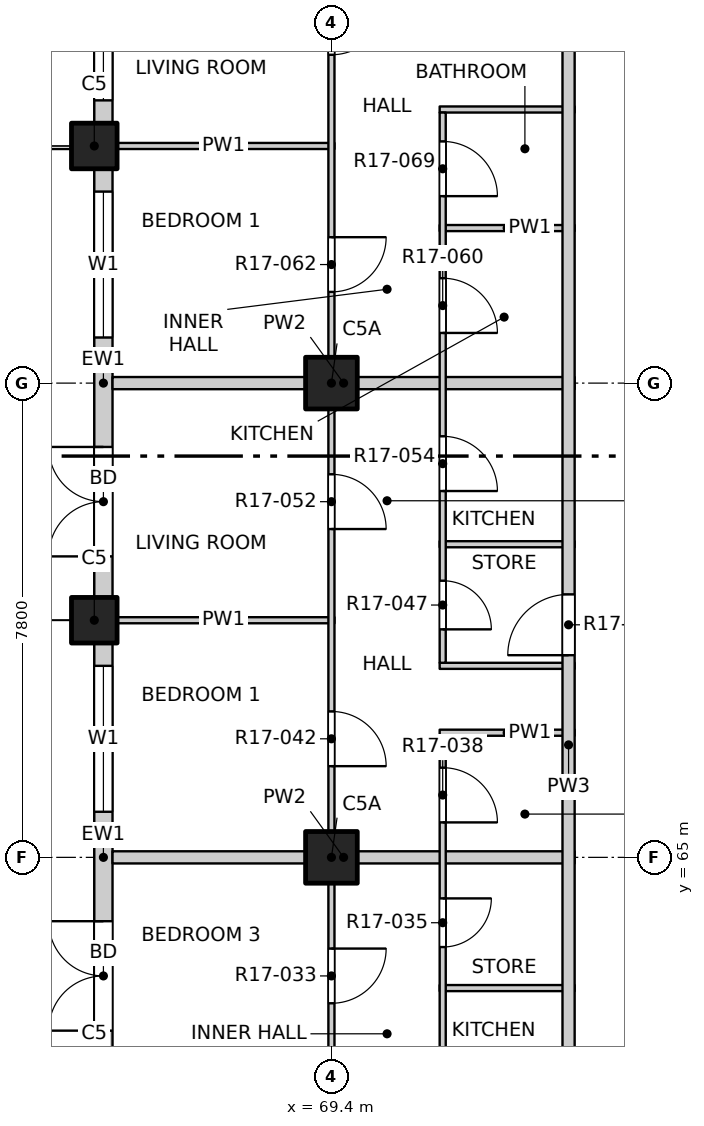
"""IFC4 building model, lengths in metres.
Left out: names, types, materials, properties, quantities, classifications, styles, units other than length and angle.
Written with IfcOpenShell. Run it as: python <this file> out.ifc"""

import sys

from ifc_helpers import new_model, si_unit, direction, frame, frame_2d, origin, origin_2d, place, context, subcontext, project, spatial, rectangle, extrude, element, fill, save


model = new_model("IFC4")
c1 = context("Model", 3, precision=1e-05, world=origin(), true_north=direction((0.0, 1.0)))
c2 = subcontext(c1, "Body", "Model", "MODEL_VIEW")
j1 = project(units=[si_unit("LENGTHUNIT", "METRE"), si_unit("PLANEANGLEUNIT", "RADIAN")], contexts=[c1])
p1 = place(None, origin())
s1 = spatial("IfcSite", under=j1, at=p1, CompositionType="ELEMENT")
p2 = place(p1, origin())
s2 = spatial("IfcBuilding", under=s1, at=p2, CompositionType="ELEMENT")
p3 = place(p2, frame((0.0, 0.0, 182.6)))
s3 = spatial("IfcBuildingStorey", under=s2, at=p3, CompositionType="ELEMENT", Elevation=182.6)
for number, where, z_axis, x_axis in (
    (1, (65.5, 68.9, -0.25), (0.0, 0.0, 1.0), (1.0, 0.0, 0.0)),
    (2, (65.5, 76.7, -0.25), (0.0, 0.0, 1.0), (1.0, 0.0, 0.0)),
):
    element("IfcColumn", number, at=place(p3, frame(where, z_axis=z_axis, x_axis=x_axis)), inside=s3, PredefinedType="COLUMN", context=c2, shape_type="SweptSolid", body=[
        extrude(rectangle(XDim=0.75, YDim=0.75, at=origin_2d()), origin(), (0.0, 0.0, 1.0), 3.4),
    ])
for number, where, z_axis, x_axis in (
    (3, (69.4, 65.0, -0.25), (0.0, 0.0, 1.0), (1.0, 0.0, 0.0)),
    (4, (69.4, 72.8, -0.25), (0.0, 0.0, 1.0), (1.0, 0.0, 0.0)),
):
    element("IfcColumn", number, at=place(p3, frame(where, z_axis=z_axis, x_axis=x_axis)), inside=s3, PredefinedType="COLUMN", context=c2, shape_type="SweptSolid", body=[
        extrude(rectangle(XDim=0.85, YDim=0.85, at=origin_2d()), origin(), (0.0, 0.0, 1.0), 3.4),
    ])
p4 = place(p3, frame((65.65, 61.475, 0.0), z_axis=(0.0, 0.0, 1.0), x_axis=(0.0, 1.0, 0.0)))
e5 = element("IfcWall", 5, at=p4, inside=s3, PredefinedType="SOLIDWALL", context=c2, shape_type="SweptSolid", body=[
    extrude(rectangle(XDim=7.05, YDim=0.3, at=frame_2d((3.525, 0.0))), origin(), (0.0, 0.0, 1.0), 2.7),
])
p5 = place(p4, frame((0.675, 0.0, 0.0)))
e6 = element("IfcOpeningElement", 6, at=p5, cuts=e5, PredefinedType="OPENING", context=c2, shape_type="SweptSolid", body=[
    extrude(rectangle(XDim=1.8, YDim=2.4, at=frame_2d((0.9, 1.2))), frame((0.0, 0.16, 0.0), z_axis=(0.0, -1.0, 0.0), x_axis=(1.0, 0.0, 0.0)), (0.0, 0.0, 1.0), 0.32),
])
p6 = place(p4, frame((4.275, 0.0, 0.9)))
e7 = element("IfcOpeningElement", 7, at=p6, cuts=e5, PredefinedType="OPENING", context=c2, shape_type="SweptSolid", body=[
    extrude(rectangle(XDim=2.4, YDim=1.8, at=frame_2d((1.2, 0.9))), frame((0.0, 0.16, 0.0), z_axis=(0.0, -1.0, 0.0), x_axis=(1.0, 0.0, 0.0)), (0.0, 0.0, 1.0), 0.32),
])
p7 = place(p3, frame((65.65, 69.275, 0.0), z_axis=(0.0, 0.0, 1.0), x_axis=(0.0, 1.0, 0.0)))
e8 = element("IfcWall", 8, at=p7, inside=s3, PredefinedType="SOLIDWALL", context=c2, shape_type="SweptSolid", body=[
    extrude(rectangle(XDim=7.05, YDim=0.3, at=frame_2d((3.525, 0.0))), origin(), (0.0, 0.0, 1.0), 2.7),
])
p8 = place(p7, frame((0.675, 0.0, 0.0)))
e9 = element("IfcOpeningElement", 9, at=p8, cuts=e8, PredefinedType="OPENING", context=c2, shape_type="SweptSolid", body=[
    extrude(rectangle(XDim=1.8, YDim=2.4, at=frame_2d((0.9, 1.2))), frame((0.0, 0.16, 0.0), z_axis=(0.0, -1.0, 0.0), x_axis=(1.0, 0.0, 0.0)), (0.0, 0.0, 1.0), 0.32),
])
p9 = place(p7, frame((4.275, 0.0, 0.9)))
e10 = element("IfcOpeningElement", 10, at=p9, cuts=e8, PredefinedType="OPENING", context=c2, shape_type="SweptSolid", body=[
    extrude(rectangle(XDim=2.4, YDim=1.8, at=frame_2d((1.2, 0.9))), frame((0.0, 0.16, 0.0), z_axis=(0.0, -1.0, 0.0), x_axis=(1.0, 0.0, 0.0)), (0.0, 0.0, 1.0), 0.32),
])
p10 = place(p3, frame((65.65, 77.075, 0.0), z_axis=(0.0, 0.0, 1.0), x_axis=(0.0, 1.0, 0.0)))
e11 = element("IfcWall", 11, at=p10, inside=s3, PredefinedType="SOLIDWALL", context=c2, shape_type="SweptSolid", body=[
    extrude(rectangle(XDim=3.525, YDim=0.3, at=frame_2d((1.763, 0.0))), origin(), (0.0, 0.0, 1.0), 2.7),
])
p11 = place(p10, frame((0.375, 0.0, 0.9)))
e12 = element("IfcOpeningElement", 12, at=p11, cuts=e11, PredefinedType="OPENING", context=c2, shape_type="SweptSolid", body=[
    extrude(rectangle(XDim=2.4, YDim=1.8, at=frame_2d((1.2, 0.9))), frame((0.0, 0.16, 0.0), z_axis=(0.0, -1.0, 0.0), x_axis=(1.0, 0.0, 0.0)), (0.0, 0.0, 1.0), 0.32),
])
p12 = place(p3, frame((71.18, 62.85, 0.0), z_axis=(0.0, 0.0, 1.0), x_axis=(1.0, 0.0, 0.0)))
e13 = element("IfcWall", 13, at=p12, inside=s3, PredefinedType="PARTITIONING", context=c2, shape_type="SweptSolid", body=[
    extrude(rectangle(XDim=2.22, YDim=0.1, at=frame_2d((1.11, 0.0))), origin(), (0.0, 0.0, 1.0), 3.15),
])
p13 = place(p3, frame((65.8, 65.0, 0.0), z_axis=(0.0, 0.0, 1.0), x_axis=(1.0, 0.0, 0.0)))
e14 = element("IfcWall", 14, at=p13, inside=s3, PredefinedType="PARTITIONING", context=c2, shape_type="SweptSolid", body=[
    extrude(rectangle(XDim=7.6, YDim=0.2, at=frame_2d((3.8, 0.0))), origin(), (0.0, 0.0, 1.0), 3.15),
])
for number, where, z_axis, x_axis in (
    (15, (71.18, 67.05, 0.0), (0.0, 0.0, 1.0), (1.0, 0.0, 0.0)),
    (16, (71.18, 68.15, 0.0), (0.0, 0.0, 1.0), (1.0, 0.0, 0.0)),
):
    element("IfcWall", number, at=place(p3, frame(where, z_axis=z_axis, x_axis=x_axis)), inside=s3, PredefinedType="PARTITIONING", context=c2, shape_type="SweptSolid", body=[
        extrude(rectangle(XDim=2.22, YDim=0.1, at=frame_2d((1.11, 0.0))), origin(), (0.0, 0.0, 1.0), 3.15),
    ])
p14 = place(p3, frame((65.8, 68.9, 0.0), z_axis=(0.0, 0.0, 1.0), x_axis=(1.0, 0.0, 0.0)))
e17 = element("IfcWall", 17, at=p14, inside=s3, PredefinedType="PARTITIONING", context=c2, shape_type="SweptSolid", body=[
    extrude(rectangle(XDim=3.65, YDim=0.1, at=frame_2d((1.825, 0.0))), origin(), (0.0, 0.0, 1.0), 2.55),
])
p15 = place(p3, frame((71.18, 70.15, 0.0), z_axis=(0.0, 0.0, 1.0), x_axis=(1.0, 0.0, 0.0)))
e18 = element("IfcWall", 18, at=p15, inside=s3, PredefinedType="PARTITIONING", context=c2, shape_type="SweptSolid", body=[
    extrude(rectangle(XDim=2.22, YDim=0.1, at=frame_2d((1.11, 0.0))), origin(), (0.0, 0.0, 1.0), 3.15),
])
p16 = place(p3, frame((65.8, 72.8, 0.0), z_axis=(0.0, 0.0, 1.0), x_axis=(1.0, 0.0, 0.0)))
e19 = element("IfcWall", 19, at=p16, inside=s3, PredefinedType="PARTITIONING", context=c2, shape_type="SweptSolid", body=[
    extrude(rectangle(XDim=7.6, YDim=0.2, at=frame_2d((3.8, 0.0))), origin(), (0.0, 0.0, 1.0), 3.15),
])
p17 = place(p3, frame((71.18, 75.35, 0.0), z_axis=(0.0, 0.0, 1.0), x_axis=(1.0, 0.0, 0.0)))
e20 = element("IfcWall", 20, at=p17, inside=s3, PredefinedType="PARTITIONING", context=c2, shape_type="SweptSolid", body=[
    extrude(rectangle(XDim=2.22, YDim=0.1, at=frame_2d((1.11, 0.0))), origin(), (0.0, 0.0, 1.0), 3.15),
])
p18 = place(p3, frame((65.8, 76.7, 0.0), z_axis=(0.0, 0.0, 1.0), x_axis=(1.0, 0.0, 0.0)))
e21 = element("IfcWall", 21, at=p18, inside=s3, PredefinedType="PARTITIONING", context=c2, shape_type="SweptSolid", body=[
    extrude(rectangle(XDim=3.65, YDim=0.1, at=frame_2d((1.825, 0.0))), origin(), (0.0, 0.0, 1.0), 2.55),
])
p19 = place(p3, frame((71.18, 77.3, 0.0), z_axis=(0.0, 0.0, 1.0), x_axis=(1.0, 0.0, 0.0)))
e22 = element("IfcWall", 22, at=p19, inside=s3, PredefinedType="PARTITIONING", context=c2, shape_type="SweptSolid", body=[
    extrude(rectangle(XDim=2.22, YDim=0.1, at=frame_2d((1.11, 0.0))), origin(), (0.0, 0.0, 1.0), 3.15),
])
p20 = place(p3, frame((69.4, 45.8, 0.0), z_axis=(0.0, 0.0, 1.0), x_axis=(0.0, 1.0, 0.0)))
e23 = element("IfcWall", 23, at=p20, inside=s3, PredefinedType="PARTITIONING", context=c2, shape_type="SweptSolid", body=[
    extrude(rectangle(XDim=38.4, YDim=0.1, at=frame_2d((19.2, 0.0))), origin(), (0.0, 0.0, 1.0), 3.15),
])
p21 = place(p20, frame((1.05, 0.0, 0.0)))
e24 = element("IfcOpeningElement", 24, at=p21, cuts=e23, PredefinedType="OPENING", context=c2, shape_type="SweptSolid", body=[
    extrude(rectangle(XDim=1.2, YDim=2.1, at=frame_2d((0.6, 1.05))), frame((0.0, 0.06, 0.0), z_axis=(0.0, -1.0, 0.0), x_axis=(1.0, 0.0, 0.0)), (0.0, 0.0, 1.0), 0.12),
])
p22 = place(p20, frame((6.9, 0.0, 0.0)))
e25 = element("IfcOpeningElement", 25, at=p22, cuts=e23, PredefinedType="OPENING", context=c2, shape_type="SweptSolid", body=[
    extrude(rectangle(XDim=1.2, YDim=2.1, at=frame_2d((0.6, 1.05))), frame((0.0, 0.06, 0.0), z_axis=(0.0, -1.0, 0.0), x_axis=(1.0, 0.0, 0.0)), (0.0, 0.0, 1.0), 0.12),
])
p23 = place(p20, frame((12.9, 0.0, 0.0)))
e26 = element("IfcOpeningElement", 26, at=p23, cuts=e23, PredefinedType="OPENING", context=c2, shape_type="SweptSolid", body=[
    extrude(rectangle(XDim=0.9, YDim=2.1, at=frame_2d((0.45, 1.05))), frame((0.0, 0.06, 0.0), z_axis=(0.0, -1.0, 0.0), x_axis=(1.0, 0.0, 0.0)), (0.0, 0.0, 1.0), 0.12),
])
p24 = place(p20, frame((16.8, 0.0, 0.0)))
e27 = element("IfcOpeningElement", 27, at=p24, cuts=e23, PredefinedType="OPENING", context=c2, shape_type="SweptSolid", body=[
    extrude(rectangle(XDim=0.9, YDim=2.1, at=frame_2d((0.45, 1.05))), frame((0.0, 0.06, 0.0), z_axis=(0.0, -1.0, 0.0), x_axis=(1.0, 0.0, 0.0)), (0.0, 0.0, 1.0), 0.12),
])
p25 = place(p20, frame((20.7, 0.0, 0.0)))
e28 = element("IfcOpeningElement", 28, at=p25, cuts=e23, PredefinedType="OPENING", context=c2, shape_type="SweptSolid", body=[
    extrude(rectangle(XDim=0.9, YDim=2.1, at=frame_2d((0.45, 1.05))), frame((0.0, 0.06, 0.0), z_axis=(0.0, -1.0, 0.0), x_axis=(1.0, 0.0, 0.0)), (0.0, 0.0, 1.0), 0.12),
])
p26 = place(p20, frame((24.6, 0.0, 0.0)))
e29 = element("IfcOpeningElement", 29, at=p26, cuts=e23, PredefinedType="OPENING", context=c2, shape_type="SweptSolid", body=[
    extrude(rectangle(XDim=0.9, YDim=2.1, at=frame_2d((0.45, 1.05))), frame((0.0, 0.06, 0.0), z_axis=(0.0, -1.0, 0.0), x_axis=(1.0, 0.0, 0.0)), (0.0, 0.0, 1.0), 0.12),
])
p27 = place(p20, frame((28.5, 0.0, 0.0)))
e30 = element("IfcOpeningElement", 30, at=p27, cuts=e23, PredefinedType="OPENING", context=c2, shape_type="SweptSolid", body=[
    extrude(rectangle(XDim=0.9, YDim=2.1, at=frame_2d((0.45, 1.05))), frame((0.0, 0.06, 0.0), z_axis=(0.0, -1.0, 0.0), x_axis=(1.0, 0.0, 0.0)), (0.0, 0.0, 1.0), 0.12),
])
p28 = place(p20, frame((32.4, 0.0, 0.0)))
e31 = element("IfcOpeningElement", 31, at=p28, cuts=e23, PredefinedType="OPENING", context=c2, shape_type="SweptSolid", body=[
    extrude(rectangle(XDim=0.9, YDim=2.1, at=frame_2d((0.45, 1.05))), frame((0.0, 0.06, 0.0), z_axis=(0.0, -1.0, 0.0), x_axis=(1.0, 0.0, 0.0)), (0.0, 0.0, 1.0), 0.12),
])
p29 = place(p20, frame((36.15, 0.0, 0.0)))
e32 = element("IfcOpeningElement", 32, at=p29, cuts=e23, PredefinedType="OPENING", context=c2, shape_type="SweptSolid", body=[
    extrude(rectangle(XDim=1.2, YDim=2.1, at=frame_2d((0.6, 1.05))), frame((0.0, 0.06, 0.0), z_axis=(0.0, -1.0, 0.0), x_axis=(1.0, 0.0, 0.0)), (0.0, 0.0, 1.0), 0.12),
])
p30 = place(p3, frame((71.23, 59.95, 0.0), z_axis=(0.0, 0.0, 1.0), x_axis=(0.0, 1.0, 0.0)))
e33 = element("IfcWall", 33, at=p30, inside=s3, PredefinedType="PARTITIONING", context=c2, shape_type="SweptSolid", body=[
    extrude(rectangle(XDim=7.05, YDim=0.1, at=frame_2d((3.525, 0.0))), origin(), (0.0, 0.0, 1.0), 3.15),
])
p31 = place(p30, frame((0.975, 0.0, 0.0)))
e34 = element("IfcOpeningElement", 34, at=p31, cuts=e33, PredefinedType="OPENING", context=c2, shape_type="SweptSolid", body=[
    extrude(rectangle(XDim=0.9, YDim=2.1, at=frame_2d((0.45, 1.05))), frame((0.0, 0.06, 0.0), z_axis=(0.0, -1.0, 0.0), x_axis=(1.0, 0.0, 0.0)), (0.0, 0.0, 1.0), 0.12),
])
p32 = place(p30, frame((3.575, 0.0, 0.0)))
e35 = element("IfcOpeningElement", 35, at=p32, cuts=e33, PredefinedType="OPENING", context=c2, shape_type="SweptSolid", body=[
    extrude(rectangle(XDim=0.8, YDim=2.1, at=frame_2d((0.4, 1.05))), frame((0.0, 0.06, 0.0), z_axis=(0.0, -1.0, 0.0), x_axis=(1.0, 0.0, 0.0)), (0.0, 0.0, 1.0), 0.12),
])
p33 = place(p30, frame((5.625, 0.0, 0.0)))
e36 = element("IfcOpeningElement", 36, at=p33, cuts=e33, PredefinedType="OPENING", context=c2, shape_type="SweptSolid", body=[
    extrude(rectangle(XDim=0.9, YDim=2.1, at=frame_2d((0.45, 1.05))), frame((0.0, 0.06, 0.0), z_axis=(0.0, -1.0, 0.0), x_axis=(1.0, 0.0, 0.0)), (0.0, 0.0, 1.0), 0.12),
])
p34 = place(p3, frame((71.23, 68.2, 0.0), z_axis=(0.0, 0.0, 1.0), x_axis=(0.0, 1.0, 0.0)))
e37 = element("IfcWall", 37, at=p34, inside=s3, PredefinedType="PARTITIONING", context=c2, shape_type="SweptSolid", body=[
    extrude(rectangle(XDim=9.05, YDim=0.1, at=frame_2d((4.525, 0.0))), origin(), (0.0, 0.0, 1.0), 3.15),
])
p35 = place(p34, frame((0.55, 0.0, 0.0)))
e38 = element("IfcOpeningElement", 38, at=p35, cuts=e37, PredefinedType="OPENING", context=c2, shape_type="SweptSolid", body=[
    extrude(rectangle(XDim=0.8, YDim=2.1, at=frame_2d((0.4, 1.05))), frame((0.0, 0.06, 0.0), z_axis=(0.0, -1.0, 0.0), x_axis=(1.0, 0.0, 0.0)), (0.0, 0.0, 1.0), 0.12),
])
p36 = place(p34, frame((2.825, 0.0, 0.0)))
e39 = element("IfcOpeningElement", 39, at=p36, cuts=e37, PredefinedType="OPENING", context=c2, shape_type="SweptSolid", body=[
    extrude(rectangle(XDim=0.9, YDim=2.1, at=frame_2d((0.45, 1.05))), frame((0.0, 0.06, 0.0), z_axis=(0.0, -1.0, 0.0), x_axis=(1.0, 0.0, 0.0)), (0.0, 0.0, 1.0), 0.12),
])
p37 = place(p34, frame((5.425, 0.0, 0.0)))
e40 = element("IfcOpeningElement", 40, at=p37, cuts=e37, PredefinedType="OPENING", context=c2, shape_type="SweptSolid", body=[
    extrude(rectangle(XDim=0.9, YDim=2.1, at=frame_2d((0.45, 1.05))), frame((0.0, 0.06, 0.0), z_axis=(0.0, -1.0, 0.0), x_axis=(1.0, 0.0, 0.0)), (0.0, 0.0, 1.0), 0.12),
])
p38 = place(p34, frame((7.675, 0.0, 0.0)))
e41 = element("IfcOpeningElement", 41, at=p38, cuts=e37, PredefinedType="OPENING", context=c2, shape_type="SweptSolid", body=[
    extrude(rectangle(XDim=0.9, YDim=2.1, at=frame_2d((0.45, 1.05))), frame((0.0, 0.06, 0.0), z_axis=(0.0, -1.0, 0.0), x_axis=(1.0, 0.0, 0.0)), (0.0, 0.0, 1.0), 0.12),
])
p39 = place(p3, frame((73.3, 49.5, 0.0), z_axis=(0.0, 0.0, 1.0), x_axis=(0.0, 1.0, 0.0)))
e42 = element("IfcWall", 42, at=p39, inside=s3, PredefinedType="PARTITIONING", context=c2, shape_type="SweptSolid", body=[
    extrude(rectangle(XDim=34.7, YDim=0.2, at=frame_2d((17.35, 0.0))), origin(), (0.0, 0.0, 1.0), 3.15),
])
p40 = place(p39, frame((10.575, 0.0, 0.0)))
e43 = element("IfcOpeningElement", 43, at=p40, cuts=e42, PredefinedType="OPENING", context=c2, shape_type="SweptSolid", body=[
    extrude(rectangle(XDim=1.0, YDim=2.1, at=frame_2d((0.5, 1.05))), frame((0.0, 0.11, 0.0), z_axis=(0.0, -1.0, 0.0), x_axis=(1.0, 0.0, 0.0)), (0.0, 0.0, 1.0), 0.22),
])
p41 = place(p39, frame((18.825, 0.0, 0.0)))
e44 = element("IfcOpeningElement", 44, at=p41, cuts=e42, PredefinedType="OPENING", context=c2, shape_type="SweptSolid", body=[
    extrude(rectangle(XDim=1.0, YDim=2.1, at=frame_2d((0.5, 1.05))), frame((0.0, 0.11, 0.0), z_axis=(0.0, -1.0, 0.0), x_axis=(1.0, 0.0, 0.0)), (0.0, 0.0, 1.0), 0.22),
])
p42 = place(p39, frame((29.075, 0.0, 0.0)))
e45 = element("IfcOpeningElement", 45, at=p42, cuts=e42, PredefinedType="OPENING", context=c2, shape_type="SweptSolid", body=[
    extrude(rectangle(XDim=1.0, YDim=2.1, at=frame_2d((0.5, 1.05))), frame((0.0, 0.11, 0.0), z_axis=(0.0, -1.0, 0.0), x_axis=(1.0, 0.0, 0.0)), (0.0, 0.0, 1.0), 0.22),
])
p43 = place(p5, origin())
e46 = element("IfcDoor", 46, at=p43, inside=s3, OperationType="DOUBLE_DOOR_SINGLE_SWING", PredefinedType="DOOR", context=c2, shape_type="SweptSolid", body=[
    extrude(rectangle(XDim=1.8, YDim=2.4, at=frame_2d((0.9, 1.2))), frame((0.0, 0.025, 0.0), z_axis=(0.0, -1.0, 0.0), x_axis=(1.0, 0.0, 0.0)), (0.0, 0.0, 1.0), 0.05),
])
fill(e6, e46)
p44 = place(p6, origin())
e47 = element("IfcWindow", 47, at=p44, inside=s3, PartitioningType="DOUBLE_PANEL_VERTICAL", PredefinedType="WINDOW", context=c2, shape_type="SweptSolid", body=[
    extrude(rectangle(XDim=2.4, YDim=1.8, at=frame_2d((1.2, 0.9))), frame((0.0, 0.03, 0.0), z_axis=(0.0, -1.0, 0.0), x_axis=(1.0, 0.0, 0.0)), (0.0, 0.0, 1.0), 0.06),
])
fill(e7, e47)
p45 = place(p8, origin())
e48 = element("IfcDoor", 48, at=p45, inside=s3, OperationType="DOUBLE_DOOR_SINGLE_SWING", PredefinedType="DOOR", context=c2, shape_type="SweptSolid", body=[
    extrude(rectangle(XDim=1.8, YDim=2.4, at=frame_2d((0.9, 1.2))), frame((0.0, 0.025, 0.0), z_axis=(0.0, -1.0, 0.0), x_axis=(1.0, 0.0, 0.0)), (0.0, 0.0, 1.0), 0.05),
])
fill(e9, e48)
p46 = place(p9, origin())
e49 = element("IfcWindow", 49, at=p46, inside=s3, PartitioningType="DOUBLE_PANEL_VERTICAL", PredefinedType="WINDOW", context=c2, shape_type="SweptSolid", body=[
    extrude(rectangle(XDim=2.4, YDim=1.8, at=frame_2d((1.2, 0.9))), frame((0.0, 0.03, 0.0), z_axis=(0.0, -1.0, 0.0), x_axis=(1.0, 0.0, 0.0)), (0.0, 0.0, 1.0), 0.06),
])
fill(e10, e49)
p47 = place(p11, origin())
e50 = element("IfcWindow", 50, at=p47, inside=s3, PartitioningType="DOUBLE_PANEL_VERTICAL", PredefinedType="WINDOW", context=c2, shape_type="SweptSolid", body=[
    extrude(rectangle(XDim=2.4, YDim=1.8, at=frame_2d((1.2, 0.9))), frame((0.0, 0.03, 0.0), z_axis=(0.0, -1.0, 0.0), x_axis=(1.0, 0.0, 0.0)), (0.0, 0.0, 1.0), 0.06),
])
fill(e12, e50)
p48 = place(p24, origin())
e51 = element("IfcDoor", 51, at=p48, inside=s3, OperationType="SINGLE_SWING_LEFT", PredefinedType="DOOR", context=c2, shape_type="SweptSolid", body=[
    extrude(rectangle(XDim=0.9, YDim=2.1, at=frame_2d((0.45, 1.05))), frame((0.0, 0.025, 0.0), z_axis=(0.0, -1.0, 0.0), x_axis=(1.0, 0.0, 0.0)), (0.0, 0.0, 1.0), 0.05),
])
fill(e27, e51)
p49 = place(p32, origin())
e52 = element("IfcDoor", 52, at=p49, inside=s3, OperationType="SINGLE_SWING_LEFT", PredefinedType="DOOR", context=c2, shape_type="SweptSolid", body=[
    extrude(rectangle(XDim=0.8, YDim=2.1, at=frame_2d((0.4, 1.05))), frame((0.0, 0.025, 0.0), z_axis=(0.0, -1.0, 0.0), x_axis=(1.0, 0.0, 0.0)), (0.0, 0.0, 1.0), 0.05),
])
fill(e35, e52)
p50 = place(p33, origin())
e53 = element("IfcDoor", 53, at=p50, inside=s3, OperationType="SINGLE_SWING_RIGHT", PredefinedType="DOOR", context=c2, shape_type="SweptSolid", body=[
    extrude(rectangle(XDim=0.9, YDim=2.1, at=frame_2d((0.45, 1.05))), frame((0.0, 0.025, 0.0), z_axis=(0.0, -1.0, 0.0), x_axis=(1.0, 0.0, 0.0)), (0.0, 0.0, 1.0), 0.05),
])
fill(e36, e53)
p51 = place(p25, origin())
e54 = element("IfcDoor", 54, at=p51, inside=s3, OperationType="SINGLE_SWING_RIGHT", PredefinedType="DOOR", context=c2, shape_type="SweptSolid", body=[
    extrude(rectangle(XDim=0.9, YDim=2.1, at=frame_2d((0.45, 1.05))), frame((0.0, 0.025, 0.0), z_axis=(0.0, -1.0, 0.0), x_axis=(1.0, 0.0, 0.0)), (0.0, 0.0, 1.0), 0.05),
])
fill(e28, e54)
p52 = place(p41, origin())
e55 = element("IfcDoor", 55, at=p52, inside=s3, OperationType="SINGLE_SWING_RIGHT", PredefinedType="DOOR", context=c2, shape_type="SweptSolid", body=[
    extrude(rectangle(XDim=1.0, YDim=2.1, at=frame_2d((0.5, 1.05))), frame((0.0, 0.025, 0.0), z_axis=(0.0, -1.0, 0.0), x_axis=(1.0, 0.0, 0.0)), (0.0, 0.0, 1.0), 0.05),
])
fill(e44, e55)
p53 = place(p35, origin())
e56 = element("IfcDoor", 56, at=p53, inside=s3, OperationType="SINGLE_SWING_RIGHT", PredefinedType="DOOR", context=c2, shape_type="SweptSolid", body=[
    extrude(rectangle(XDim=0.8, YDim=2.1, at=frame_2d((0.4, 1.05))), frame((0.0, 0.025, 0.0), z_axis=(0.0, -1.0, 0.0), x_axis=(1.0, 0.0, 0.0)), (0.0, 0.0, 1.0), 0.05),
])
fill(e38, e56)
p54 = place(p26, origin())
e57 = element("IfcDoor", 57, at=p54, inside=s3, OperationType="SINGLE_SWING_RIGHT", PredefinedType="DOOR", context=c2, shape_type="SweptSolid", body=[
    extrude(rectangle(XDim=0.9, YDim=2.1, at=frame_2d((0.45, 1.05))), frame((0.0, 0.025, 0.0), z_axis=(0.0, -1.0, 0.0), x_axis=(1.0, 0.0, 0.0)), (0.0, 0.0, 1.0), 0.05),
])
fill(e29, e57)
p55 = place(p36, origin())
e58 = element("IfcDoor", 58, at=p55, inside=s3, OperationType="SINGLE_SWING_RIGHT", PredefinedType="DOOR", context=c2, shape_type="SweptSolid", body=[
    extrude(rectangle(XDim=0.9, YDim=2.1, at=frame_2d((0.45, 1.05))), frame((0.0, 0.025, 0.0), z_axis=(0.0, -1.0, 0.0), x_axis=(1.0, 0.0, 0.0)), (0.0, 0.0, 1.0), 0.05),
])
fill(e39, e58)
p56 = place(p37, origin())
e59 = element("IfcDoor", 59, at=p56, inside=s3, OperationType="SINGLE_SWING_RIGHT", PredefinedType="DOOR", context=c2, shape_type="SweptSolid", body=[
    extrude(rectangle(XDim=0.9, YDim=2.1, at=frame_2d((0.45, 1.05))), frame((0.0, 0.025, 0.0), z_axis=(0.0, -1.0, 0.0), x_axis=(1.0, 0.0, 0.0)), (0.0, 0.0, 1.0), 0.05),
])
fill(e40, e59)
p57 = place(p27, origin())
e60 = element("IfcDoor", 60, at=p57, inside=s3, OperationType="SINGLE_SWING_LEFT", PredefinedType="DOOR", context=c2, shape_type="SweptSolid", body=[
    extrude(rectangle(XDim=0.9, YDim=2.1, at=frame_2d((0.45, 1.05))), frame((0.0, 0.025, 0.0), z_axis=(0.0, -1.0, 0.0), x_axis=(1.0, 0.0, 0.0)), (0.0, 0.0, 1.0), 0.05),
])
fill(e30, e60)
p58 = place(p38, origin())
e61 = element("IfcDoor", 61, at=p58, inside=s3, OperationType="SINGLE_SWING_RIGHT", PredefinedType="DOOR", context=c2, shape_type="SweptSolid", body=[
    extrude(rectangle(XDim=0.9, YDim=2.1, at=frame_2d((0.45, 1.05))), frame((0.0, 0.025, 0.0), z_axis=(0.0, -1.0, 0.0), x_axis=(1.0, 0.0, 0.0)), (0.0, 0.0, 1.0), 0.05),
])
fill(e41, e61)
p59 = place(p28, origin())
e62 = element("IfcDoor", 62, at=p59, inside=s3, OperationType="SINGLE_SWING_LEFT", PredefinedType="DOOR", context=c2, shape_type="SweptSolid", body=[
    extrude(rectangle(XDim=0.9, YDim=2.1, at=frame_2d((0.45, 1.05))), frame((0.0, 0.025, 0.0), z_axis=(0.0, -1.0, 0.0), x_axis=(1.0, 0.0, 0.0)), (0.0, 0.0, 1.0), 0.05),
])
fill(e31, e62)
save(model, sys.argv[1])
